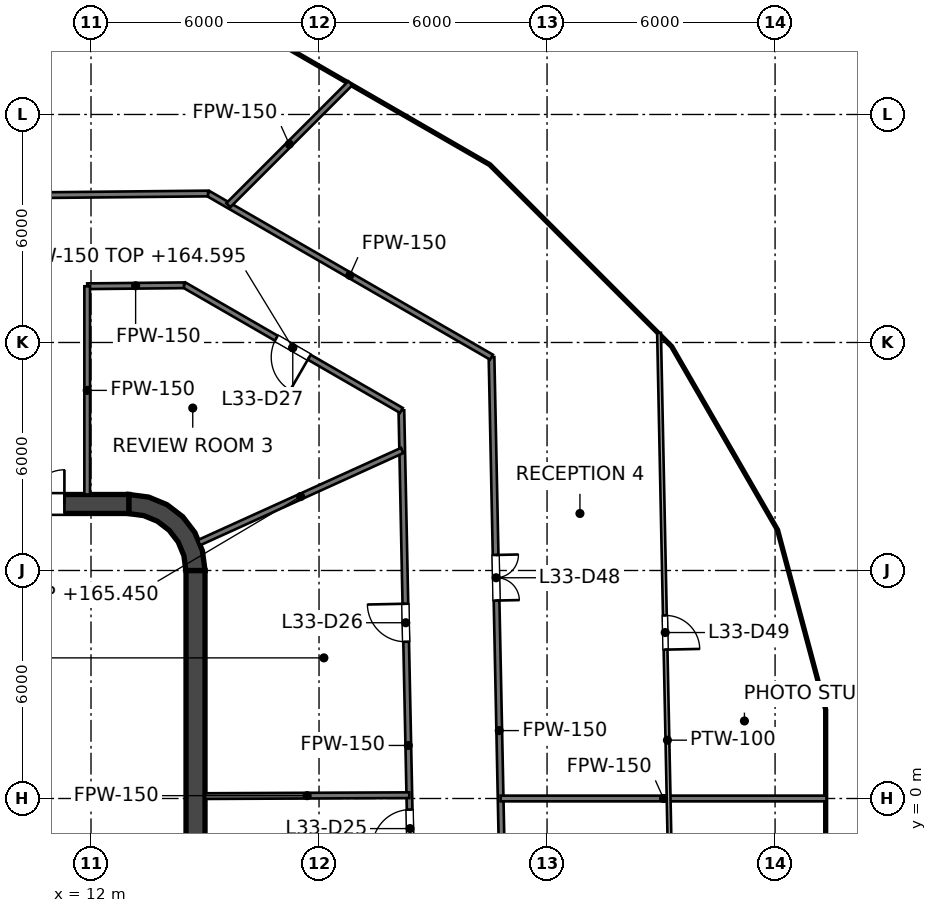
"""IFC4 building model, lengths in metres.
Left out: names, types, materials, properties, quantities, classifications, styles, units other than length and angle.
Written with IfcOpenShell. Run it as: python <this file> out.ifc"""

import sys

from ifc_helpers import new_model, si_unit, direction, frame, frame_2d, origin, place, context, subcontext, project, spatial, polyline, rectangle, outline, extrude, element, fill, save


model = new_model("IFC4")
c1 = context("Model", 3, precision=1e-05, world=origin(), true_north=direction((0.0, 1.0)))
c2 = subcontext(c1, "Body", "Model", "MODEL_VIEW")
j1 = project(units=[si_unit("LENGTHUNIT", "METRE"), si_unit("PLANEANGLEUNIT", "RADIAN")], contexts=[c1])
p1 = place(None, origin())
s1 = spatial("IfcSite", under=j1, at=p1, CompositionType="ELEMENT")
p2 = place(p1, origin())
s2 = spatial("IfcBuilding", under=s1, at=p2, CompositionType="ELEMENT")
p3 = place(p2, frame((0.0, 0.0, 161.6)))
s3 = spatial("IfcBuildingStorey", under=s2, at=p3, CompositionType="ELEMENT", Elevation=161.6)
p4 = place(p3, frame((-13.0, 7.75, 0.0), z_axis=(0.0, 0.0, 1.0), x_axis=(1.0, 0.0, 0.0)))
e1 = element("IfcWall", 1, at=p4, inside=s3, PredefinedType="SHEAR", context=c2, shape_type="SweptSolid", body=[
    extrude(rectangle(XDim=26.0, YDim=0.5, at=frame_2d((13.0, 0.0))), origin(), (0.0, 0.0, 1.0), 4.0),
])
p5 = place(p4, frame((1.7, 0.0, 0.0)))
e2 = element("IfcOpeningElement", 2, at=p5, cuts=e1, PredefinedType="OPENING", context=c2, shape_type="SweptSolid", body=[
    extrude(rectangle(XDim=1.8, YDim=2.1, at=frame_2d((0.9, 1.05))), frame((0.0, 0.25, 0.0), z_axis=(0.0, -1.0, 0.0), x_axis=(1.0, 0.0, 0.0)), (0.0, 0.0, 1.0), 0.5),
])
p6 = place(p4, frame((22.5, 0.0, 0.0)))
e3 = element("IfcOpeningElement", 3, at=p6, cuts=e1, PredefinedType="OPENING", context=c2, shape_type="SweptSolid", body=[
    extrude(rectangle(XDim=1.8, YDim=2.1, at=frame_2d((0.9, 1.05))), frame((0.0, 0.25, 0.0), z_axis=(0.0, -1.0, 0.0), x_axis=(1.0, 0.0, 0.0)), (0.0, 0.0, 1.0), 0.5),
])
p7 = place(p3, frame((14.75, -6.0, 0.0), z_axis=(0.0, 0.0, 1.0), x_axis=(0.0, 1.0, 0.0)))
e4 = element("IfcWall", 4, at=p7, inside=s3, PredefinedType="SHEAR", context=c2, shape_type="SweptSolid", body=[
    extrude(rectangle(XDim=12.0, YDim=0.5, at=frame_2d((6.0, 0.0))), origin(), (0.0, 0.0, 1.0), 4.0),
])
p8 = place(p3, origin())
e5 = element("IfcWall", 5, at=p8, inside=s3, PredefinedType="SHEAR", context=c2, shape_type="SweptSolid", body=[
    extrude(outline(polyline([(13.0, 8.0), (13.0, 7.496), (13.387, 7.445), (13.748, 7.295), (14.058, 7.058), (14.295, 6.748), (14.445, 6.387), (14.496, 6.0), (15.0, 6.0), (14.932, 6.518), (14.732, 7.0), (14.414, 7.414), (14.0, 7.732), (13.518, 7.932), (13.0, 8.0)])), origin(), (0.0, 0.0, 1.0), 4.0),
])
p9 = place(p3, frame((11.8, -7.5, 0.0), z_axis=(0.0, 0.0, 1.0), x_axis=(0.0, 1.0, 0.0)))
e6 = element("IfcWall", 6, at=p9, inside=s3, PredefinedType="SOLIDWALL", context=c2, shape_type="SweptSolid", body=[
    extrude(rectangle(XDim=15.0, YDim=0.4, at=frame_2d((7.5, 0.0))), origin(), (0.0, 0.0, 1.0), 3.85),
])
p10 = place(p9, frame((11.3, 0.0, 0.0)))
e7 = element("IfcOpeningElement", 7, at=p10, cuts=e6, PredefinedType="OPENING", context=c2, shape_type="SweptSolid", body=[
    extrude(rectangle(XDim=1.1, YDim=2.1, at=frame_2d((0.55, 1.05))), frame((0.0, 0.2, 0.0), z_axis=(0.0, -1.0, 0.0), x_axis=(1.0, 0.0, 0.0)), (0.0, 0.0, 1.0), 0.4),
])
p11 = place(p9, frame((8.4, 0.0, 0.0)))
e8 = element("IfcOpeningElement", 8, at=p11, cuts=e6, PredefinedType="OPENING", context=c2, shape_type="SweptSolid", body=[
    extrude(rectangle(XDim=1.1, YDim=2.1, at=frame_2d((0.55, 1.05))), frame((0.0, 0.2, 0.0), z_axis=(0.0, -1.0, 0.0), x_axis=(1.0, 0.0, 0.0)), (0.0, 0.0, 1.0), 0.4),
])
p12 = place(p9, frame((5.5, 0.0, 0.0)))
e9 = element("IfcOpeningElement", 9, at=p12, cuts=e6, PredefinedType="OPENING", context=c2, shape_type="SweptSolid", body=[
    extrude(rectangle(XDim=1.1, YDim=2.1, at=frame_2d((0.55, 1.05))), frame((0.0, 0.2, 0.0), z_axis=(0.0, -1.0, 0.0), x_axis=(1.0, 0.0, 0.0)), (0.0, 0.0, 1.0), 0.4),
])
p13 = place(p9, frame((13.697, 0.0, 0.0)))
e10 = element("IfcOpeningElement", 10, at=p13, cuts=e6, PredefinedType="OPENING", context=c2, shape_type="SweptSolid", body=[
    extrude(rectangle(XDim=0.9, YDim=2.1, at=frame_2d((0.45, 1.05))), frame((0.0, 0.2, 0.0), z_axis=(0.0, -1.0, 0.0), x_axis=(1.0, 0.0, 0.0)), (0.0, 0.0, 1.0), 0.4),
])
p14 = place(p9, frame((0.403, 0.0, 0.0)))
e11 = element("IfcOpeningElement", 11, at=p14, cuts=e6, PredefinedType="OPENING", context=c2, shape_type="SweptSolid", body=[
    extrude(rectangle(XDim=0.9, YDim=2.1, at=frame_2d((0.45, 1.05))), frame((0.0, 0.2, 0.0), z_axis=(0.0, -1.0, 0.0), x_axis=(1.0, 0.0, 0.0)), (0.0, 0.0, 1.0), 0.4),
])
e12 = element("IfcWall", 12, at=p8, inside=s3, PredefinedType="SOLIDWALL", context=c2, shape_type="SweptSolid", body=[
    extrude(outline(polyline([(12.0, -5.675), (12.0, -5.925), (14.25, -5.925), (14.5, -5.925), (14.5, -5.675), (14.5, -3.025), (14.5, -2.775), (14.5, -0.125), (14.5, 0.125), (14.5, 2.775), (14.5, 3.025), (14.5, 5.675), (14.5, 5.925), (14.25, 5.925), (12.0, 5.925), (12.0, 5.675), (14.25, 5.675), (14.25, 3.025), (12.0, 3.025), (12.0, 2.775), (14.25, 2.775), (14.25, 0.125), (12.0, 0.125), (12.0, -0.125), (14.25, -0.125), (14.25, -2.775), (12.0, -2.775), (12.0, -3.025), (14.25, -3.025), (14.25, -5.675), (12.0, -5.675)])), origin(), (0.0, 0.0, 1.0), 3.85),
])
p15 = place(p3, frame((20.167, 10.213, 0.0), z_axis=(0.0, 0.0, 1.0), x_axis=(0.020638567039, -0.999787002091, 0.0)))
e13 = element("IfcWall", 13, at=p15, inside=s3, PredefinedType="PARTITIONING", context=c2, shape_type="SweptSolid", body=[
    extrude(rectangle(XDim=17.637, YDim=0.15, at=frame_2d((8.819, 0.0))), origin(), (0.0, 0.0, 1.0), 2.927),
])
p16 = place(p15, frame((10.507, 0.0, 0.0)))
e14 = element("IfcOpeningElement", 14, at=p16, cuts=e13, PredefinedType="OPENING", context=c2, shape_type="SweptSolid", body=[
    extrude(rectangle(XDim=1.0, YDim=2.1, at=frame_2d((0.5, 1.05))), frame((0.0, 0.075, 0.0), z_axis=(0.0, -1.0, 0.0), x_axis=(1.0, 0.0, 0.0)), (0.0, 0.0, 1.0), 0.15),
])
p17 = place(p15, frame((5.089, 0.0, 0.0)))
e15 = element("IfcOpeningElement", 15, at=p17, cuts=e13, PredefinedType="OPENING", context=c2, shape_type="SweptSolid", body=[
    extrude(rectangle(XDim=1.0, YDim=2.1, at=frame_2d((0.5, 1.05))), frame((0.0, 0.075, 0.0), z_axis=(0.0, -1.0, 0.0), x_axis=(1.0, 0.0, 0.0)), (0.0, 0.0, 1.0), 0.15),
])
p18 = place(p3, frame((22.539, 11.615, 0.0), z_axis=(0.0, 0.0, 1.0), x_axis=(0.020626332176, -0.99978725458, 0.0)))
e16 = element("IfcWall", 16, at=p18, inside=s3, PredefinedType="PARTITIONING", context=c2, shape_type="SweptSolid", body=[
    extrude(rectangle(XDim=19.66, YDim=0.15, at=frame_2d((9.83, 0.0))), origin(), (0.0, 0.0, 1.0), 2.927),
])
p19 = place(p18, frame((5.208, 0.0, 0.0)))
e17 = element("IfcOpeningElement", 17, at=p19, cuts=e16, PredefinedType="OPENING", context=c2, shape_type="SweptSolid", body=[
    extrude(rectangle(XDim=1.2, YDim=2.1, at=frame_2d((0.6, 1.05))), frame((0.0, 0.075, 0.0), z_axis=(0.0, -1.0, 0.0), x_axis=(1.0, 0.0, 0.0)), (0.0, 0.0, 1.0), 0.15),
])
p20 = place(p3, frame((14.448, 13.515, 0.0), z_axis=(0.0, 0.0, 1.0), x_axis=(0.865975016585, -0.500087263036, 0.0)))
e18 = element("IfcWall", 18, at=p20, inside=s3, PredefinedType="PARTITIONING", context=c2, shape_type="SweptSolid", body=[
    extrude(rectangle(XDim=6.604, YDim=0.15, at=frame_2d((3.302, 0.0))), origin(), (0.0, 0.0, 1.0), 2.995),
])
p21 = place(p20, frame((2.804, 0.0, 0.0)))
e19 = element("IfcOpeningElement", 19, at=p21, cuts=e18, PredefinedType="OPENING", context=c2, shape_type="SweptSolid", body=[
    extrude(rectangle(XDim=1.0, YDim=2.1, at=frame_2d((0.5, 1.05))), frame((0.0, 0.075, 0.0), z_axis=(0.0, -1.0, 0.0), x_axis=(1.0, 0.0, 0.0)), (0.0, 0.0, 1.0), 0.15),
])
p22 = place(p3, frame((15.08, 15.921, 0.0), z_axis=(0.0, 0.0, 1.0), x_axis=(0.865982112089, -0.50007497592, 0.0)))
e20 = element("IfcWall", 20, at=p22, inside=s3, PredefinedType="PARTITIONING", context=c2, shape_type="SweptSolid", body=[
    extrude(rectangle(XDim=8.613, YDim=0.15, at=frame_2d((4.306, 0.0))), origin(), (0.0, 0.0, 1.0), 2.927),
])
p23 = place(p3, frame((22.778, 0.0, 0.0), z_axis=(0.0, 0.0, 1.0), x_axis=(1.0, 0.0, 0.0)))
e21 = element("IfcWall", 21, at=p23, inside=s3, PredefinedType="PARTITIONING", context=c2, shape_type="SweptSolid", body=[
    extrude(rectangle(XDim=8.574, YDim=0.15, at=frame_2d((4.287, 0.0))), origin(), (0.0, 0.0, 1.0), 2.927),
])
p24 = place(p3, frame((15.0, 0.063, 0.0), z_axis=(0.0, 0.0, 1.0), x_axis=(0.999990294223, 0.004405843865, 0.0)))
e22 = element("IfcWall", 22, at=p24, inside=s3, PredefinedType="PARTITIONING", context=c2, shape_type="SweptSolid", body=[
    extrude(rectangle(XDim=5.375, YDim=0.15, at=frame_2d((2.688, 0.0))), origin(), (0.0, 0.0, 1.0), 2.927),
])
p25 = place(p3, frame((11.9, 13.48, 0.0), z_axis=(0.0, 0.0, 1.0), x_axis=(0.999951307579, 0.009868255694, 0.0)))
e23 = element("IfcWall", 23, at=p25, inside=s3, PredefinedType="PARTITIONING", context=c2, shape_type="SweptSolid", body=[
    extrude(rectangle(XDim=2.548, YDim=0.15, at=frame_2d((1.274, 0.0))), origin(), (0.0, 0.0, 1.0), 2.927),
])
p26 = place(p3, frame((-18.587, 15.587, 0.0), z_axis=(0.0, 0.0, 1.0), x_axis=(0.999950941879, 0.009905242833, 0.0)))
e24 = element("IfcWall", 24, at=p26, inside=s3, PredefinedType="PARTITIONING", context=c2, shape_type="SweptSolid", body=[
    extrude(rectangle(XDim=33.669, YDim=0.15, at=frame_2d((16.834, 0.0))), origin(), (0.0, 0.0, 1.0), 2.927),
])
p27 = place(p26, frame((7.592, 0.0, 0.0)))
e25 = element("IfcOpeningElement", 25, at=p27, cuts=e24, PredefinedType="OPENING", context=c2, shape_type="SweptSolid", body=[
    extrude(rectangle(XDim=1.0, YDim=2.1, at=frame_2d((0.5, 1.05))), frame((0.0, 0.075, 0.0), z_axis=(0.0, -1.0, 0.0), x_axis=(1.0, 0.0, 0.0)), (0.0, 0.0, 1.0), 0.15),
])
p28 = place(p26, frame((27.746, 0.0, 0.0)))
e26 = element("IfcOpeningElement", 26, at=p28, cuts=e24, PredefinedType="OPENING", context=c2, shape_type="SweptSolid", body=[
    extrude(rectangle(XDim=1.0, YDim=2.1, at=frame_2d((0.5, 1.05))), frame((0.0, 0.075, 0.0), z_axis=(0.0, -1.0, 0.0), x_axis=(1.0, 0.0, 0.0)), (0.0, 0.0, 1.0), 0.15),
])
p29 = place(p26, frame((16.335, 0.0, 0.0)))
e27 = element("IfcOpeningElement", 27, at=p29, cuts=e24, PredefinedType="OPENING", context=c2, shape_type="SweptSolid", body=[
    extrude(rectangle(XDim=1.0, YDim=2.1, at=frame_2d((0.5, 1.05))), frame((0.0, 0.075, 0.0), z_axis=(0.0, -1.0, 0.0), x_axis=(1.0, 0.0, 0.0)), (0.0, 0.0, 1.0), 0.15),
])
p30 = place(p3, frame((14.843, 6.733, 0.0), z_axis=(0.0, 0.0, 1.0), x_axis=(0.910628361306, 0.413226315214, 0.0)))
e28 = element("IfcWall", 28, at=p30, inside=s3, PredefinedType="PARTITIONING", context=c2, shape_type="SweptSolid", body=[
    extrude(rectangle(XDim=5.87, YDim=0.15, at=frame_2d((2.935, 0.0))), origin(), (0.0, 0.0, 1.0), 3.85),
])
p31 = place(p3, frame((15.613, 15.613, 0.0), z_axis=(0.0, 0.0, 1.0), x_axis=(0.707106781187, 0.707106781187, 0.0)))
e29 = element("IfcWall", 29, at=p31, inside=s3, PredefinedType="PARTITIONING", context=c2, shape_type="SweptSolid", body=[
    extrude(rectangle(XDim=4.538, YDim=0.15, at=frame_2d((2.269, 0.0))), origin(), (0.0, 0.0, 1.0), 2.927),
])
p32 = place(p3, frame((11.9, 8.0, 0.0), z_axis=(0.0, 0.0, 1.0), x_axis=(0.0, 1.0, 0.0)))
e30 = element("IfcWall", 30, at=p32, inside=s3, PredefinedType="PARTITIONING", context=c2, shape_type="SweptSolid", body=[
    extrude(rectangle(XDim=5.479, YDim=0.15, at=frame_2d((2.74, 0.0))), origin(), (0.0, 0.0, 1.0), 2.927),
])
p33 = place(p3, frame((26.947, 12.253, 0.0), z_axis=(0.0, 0.0, 1.0), x_axis=(0.02056465771, -0.999788525066, 0.0)))
e31 = element("IfcWall", 31, at=p33, inside=s3, PredefinedType="PARTITIONING", context=c2, shape_type="SweptSolid", body=[
    extrude(rectangle(XDim=21.441, YDim=0.1, at=frame_2d((10.72, 0.0))), origin(), (0.0, 0.0, 1.0), 2.927),
])
p34 = place(p33, frame((15.993, 0.0, 0.0)))
e32 = element("IfcOpeningElement", 32, at=p34, cuts=e31, PredefinedType="OPENING", context=c2, shape_type="SweptSolid", body=[
    extrude(rectangle(XDim=0.9, YDim=2.1, at=frame_2d((0.45, 1.05))), frame((0.0, 0.05, 0.0), z_axis=(0.0, -1.0, 0.0), x_axis=(1.0, 0.0, 0.0)), (0.0, 0.0, 1.0), 0.1),
])
p35 = place(p33, frame((7.437, 0.0, 0.0)))
e33 = element("IfcOpeningElement", 33, at=p35, cuts=e31, PredefinedType="OPENING", context=c2, shape_type="SweptSolid", body=[
    extrude(rectangle(XDim=0.9, YDim=2.1, at=frame_2d((0.45, 1.05))), frame((0.0, 0.05, 0.0), z_axis=(0.0, -1.0, 0.0), x_axis=(1.0, 0.0, 0.0)), (0.0, 0.0, 1.0), 0.1),
])
p36 = place(p10, origin())
e34 = element("IfcDoor", 34, at=p36, inside=s3, OperationType="DOUBLE_DOOR_SLIDING", PredefinedType="DOOR", context=c2, shape_type="SweptSolid", body=[
    extrude(rectangle(XDim=1.1, YDim=2.1, at=frame_2d((0.55, 1.05))), frame((0.0, 0.025, 0.0), z_axis=(0.0, -1.0, 0.0), x_axis=(1.0, 0.0, 0.0)), (0.0, 0.0, 1.0), 0.05),
])
fill(e7, e34)
p37 = place(p11, origin())
e35 = element("IfcDoor", 35, at=p37, inside=s3, OperationType="DOUBLE_DOOR_SLIDING", PredefinedType="DOOR", context=c2, shape_type="SweptSolid", body=[
    extrude(rectangle(XDim=1.1, YDim=2.1, at=frame_2d((0.55, 1.05))), frame((0.0, 0.025, 0.0), z_axis=(0.0, -1.0, 0.0), x_axis=(1.0, 0.0, 0.0)), (0.0, 0.0, 1.0), 0.05),
])
fill(e8, e35)
p38 = place(p12, origin())
e36 = element("IfcDoor", 36, at=p38, inside=s3, OperationType="DOUBLE_DOOR_SLIDING", PredefinedType="DOOR", context=c2, shape_type="SweptSolid", body=[
    extrude(rectangle(XDim=1.1, YDim=2.1, at=frame_2d((0.55, 1.05))), frame((0.0, 0.025, 0.0), z_axis=(0.0, -1.0, 0.0), x_axis=(1.0, 0.0, 0.0)), (0.0, 0.0, 1.0), 0.05),
])
fill(e9, e36)
p39 = place(p13, origin())
e37 = element("IfcDoor", 37, at=p39, inside=s3, OperationType="SINGLE_SWING_RIGHT", PredefinedType="DOOR", context=c2, shape_type="SweptSolid", body=[
    extrude(rectangle(XDim=0.9, YDim=2.1, at=frame_2d((0.45, 1.05))), frame((0.0, 0.025, 0.0), z_axis=(0.0, -1.0, 0.0), x_axis=(1.0, 0.0, 0.0)), (0.0, 0.0, 1.0), 0.05),
])
fill(e10, e37)
p40 = place(p6, origin())
e38 = element("IfcDoor", 38, at=p40, inside=s3, OperationType="DOUBLE_DOOR_SINGLE_SWING", PredefinedType="DOOR", context=c2, shape_type="SweptSolid", body=[
    extrude(rectangle(XDim=1.8, YDim=2.1, at=frame_2d((0.9, 1.05))), frame((0.0, 0.025, 0.0), z_axis=(0.0, -1.0, 0.0), x_axis=(1.0, 0.0, 0.0)), (0.0, 0.0, 1.0), 0.05),
])
fill(e3, e38)
p41 = place(p16, origin())
e39 = element("IfcDoor", 39, at=p41, inside=s3, OperationType="SINGLE_SWING_RIGHT", PredefinedType="DOOR", context=c2, shape_type="SweptSolid", body=[
    extrude(rectangle(XDim=1.0, YDim=2.1, at=frame_2d((0.5, 1.05))), frame((0.0, 0.025, 0.0), z_axis=(0.0, -1.0, 0.0), x_axis=(1.0, 0.0, 0.0)), (0.0, 0.0, 1.0), 0.05),
])
fill(e14, e39)
p42 = place(p17, origin())
e40 = element("IfcDoor", 40, at=p42, inside=s3, OperationType="SINGLE_SWING_LEFT", PredefinedType="DOOR", context=c2, shape_type="SweptSolid", body=[
    extrude(rectangle(XDim=1.0, YDim=2.1, at=frame_2d((0.5, 1.05))), frame((0.0, 0.025, 0.0), z_axis=(0.0, -1.0, 0.0), x_axis=(1.0, 0.0, 0.0)), (0.0, 0.0, 1.0), 0.05),
])
fill(e15, e40)
p43 = place(p21, origin())
e41 = element("IfcDoor", 41, at=p43, inside=s3, OperationType="SINGLE_SWING_RIGHT", PredefinedType="DOOR", context=c2, shape_type="SweptSolid", body=[
    extrude(rectangle(XDim=1.0, YDim=2.1, at=frame_2d((0.5, 1.05))), frame((0.0, 0.025, 0.0), z_axis=(0.0, -1.0, 0.0), x_axis=(1.0, 0.0, 0.0)), (0.0, 0.0, 1.0), 0.05),
])
fill(e19, e41)
p44 = place(p19, origin())
e42 = element("IfcDoor", 42, at=p44, inside=s3, OperationType="DOUBLE_DOOR_SINGLE_SWING", PredefinedType="DOOR", context=c2, shape_type="SweptSolid", body=[
    extrude(rectangle(XDim=1.2, YDim=2.1, at=frame_2d((0.6, 1.05))), frame((0.0, 0.025, 0.0), z_axis=(0.0, -1.0, 0.0), x_axis=(1.0, 0.0, 0.0)), (0.0, 0.0, 1.0), 0.05),
])
fill(e17, e42)
p45 = place(p35, origin())
e43 = element("IfcDoor", 43, at=p45, inside=s3, OperationType="SINGLE_SWING_RIGHT", PredefinedType="DOOR", context=c2, shape_type="SweptSolid", body=[
    extrude(rectangle(XDim=0.9, YDim=2.1, at=frame_2d((0.45, 1.05))), frame((0.0, 0.025, 0.0), z_axis=(0.0, -1.0, 0.0), x_axis=(1.0, 0.0, 0.0)), (0.0, 0.0, 1.0), 0.05),
])
fill(e33, e43)
save(model, sys.argv[1])
